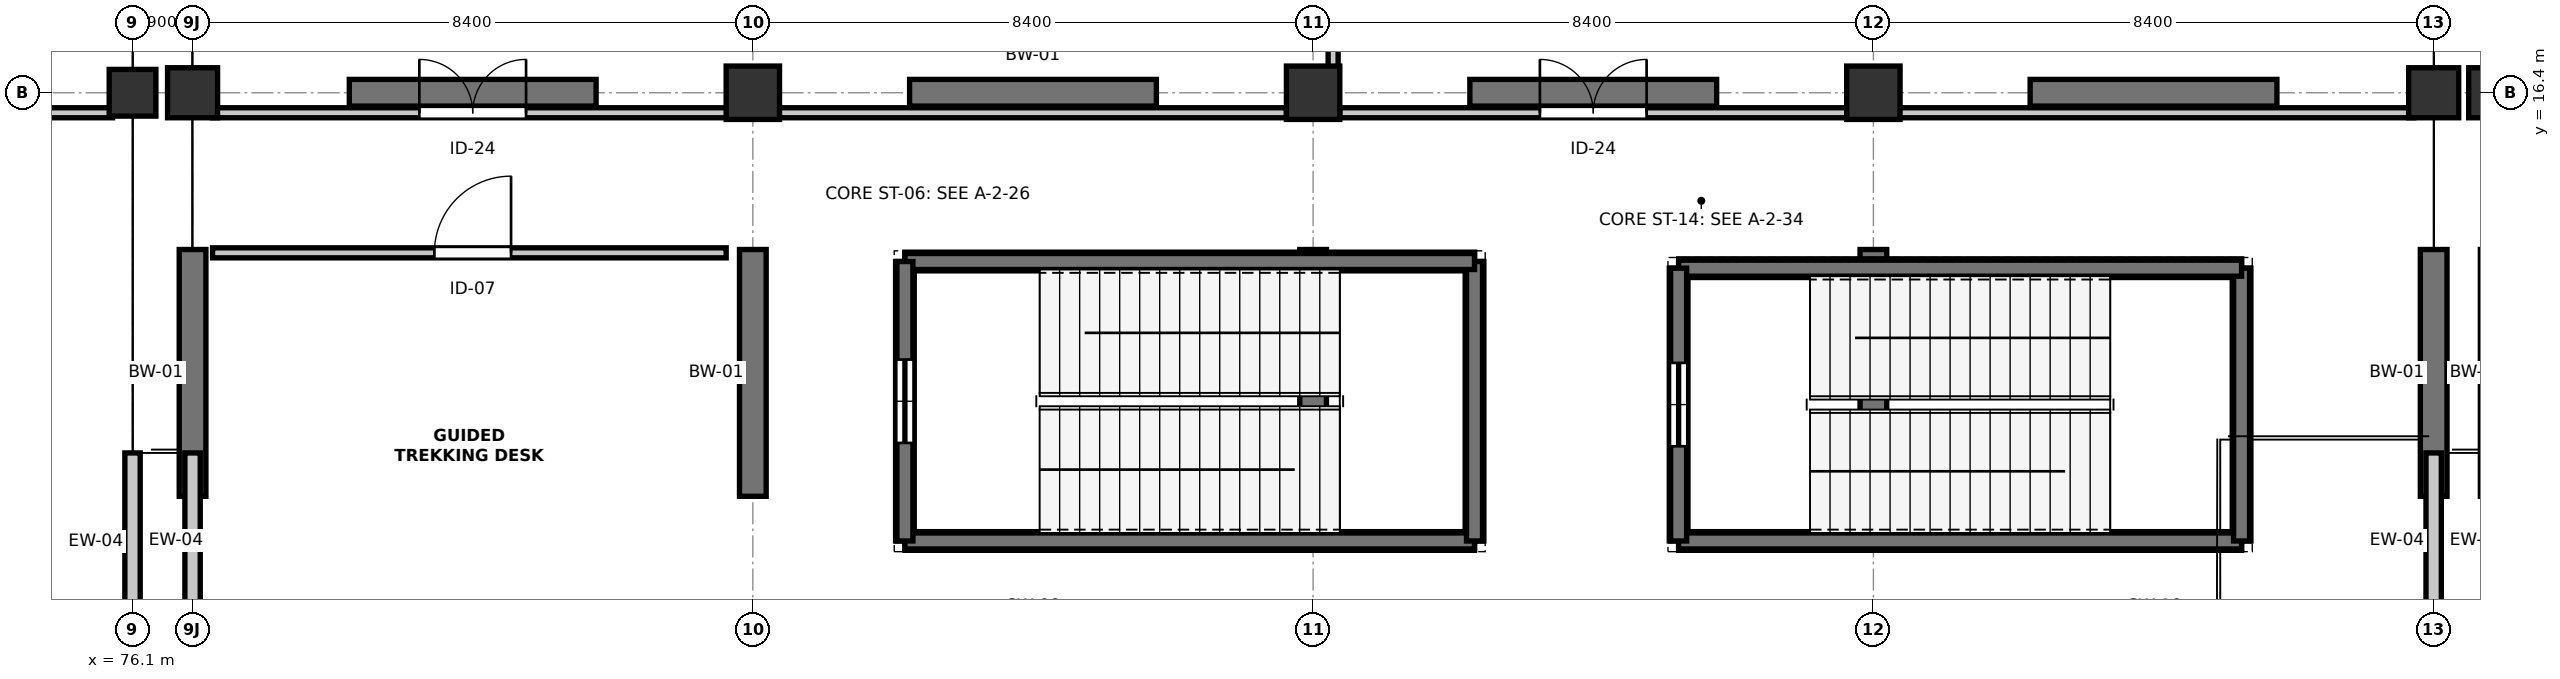
"""IFC4 building model, lengths in metres.
Left out: names, types, materials, properties, quantities, classifications, styles, units other than length and angle.
Written with IfcOpenShell. Run it as: python <this file> out.ifc"""

import sys

from ifc_helpers import new_model, si_unit, direction, frame, frame_2d, origin, origin_2d, place, context, subcontext, project, spatial, rectangle, extrude, element, fill, save


model = new_model("IFC4")
c1 = context("Model", 3, precision=1e-05, world=origin(), true_north=direction((0.0, 1.0)))
c2 = subcontext(c1, "Body", "Model", "MODEL_VIEW")
j1 = project(units=[si_unit("LENGTHUNIT", "METRE"), si_unit("PLANEANGLEUNIT", "RADIAN")], contexts=[c1])
p1 = place(None, origin())
s1 = spatial("IfcSite", under=j1, at=p1, CompositionType="ELEMENT")
p2 = place(p1, origin())
s2 = spatial("IfcBuilding", under=s1, at=p2, CompositionType="ELEMENT")
p3 = place(p2, frame((0.0, 0.0, 4.8)))
s3 = spatial("IfcBuildingStorey", under=s2, at=p3, CompositionType="ELEMENT", Elevation=4.8)
p4 = place(p3, frame((76.1, 16.4, 0.0), z_axis=(0.0, 0.0, 1.0), x_axis=(1.0, 0.0, 0.0)))
e1 = element("IfcColumn", 1, at=p4, inside=s3, PredefinedType="COLUMN", context=c2, shape_type="SweptSolid", body=[
    extrude(rectangle(XDim=0.7, YDim=0.7, at=origin_2d()), origin(), (0.0, 0.0, 1.0), 4.8),
])
p5 = place(p3, frame((77.0, 16.4, 0.0), z_axis=(0.0, 0.0, 1.0), x_axis=(1.0, 0.0, 0.0)))
e2 = element("IfcColumn", 2, at=p5, inside=s3, PredefinedType="COLUMN", context=c2, shape_type="SweptSolid", body=[
    extrude(rectangle(XDim=0.75, YDim=0.75, at=origin_2d()), origin(), (0.0, 0.0, 1.0), 4.8),
])
for number, where, z_axis, x_axis in (
    (3, (85.4, 16.4, 0.0), (0.0, 0.0, 1.0), (1.0, 0.0, 0.0)),
    (4, (93.8, 16.4, 0.0), (0.0, 0.0, 1.0), (1.0, 0.0, 0.0)),
    (5, (102.2, 16.4, 0.0), (0.0, 0.0, 1.0), (1.0, 0.0, 0.0)),
):
    element("IfcColumn", number, at=place(p3, frame(where, z_axis=z_axis, x_axis=x_axis)), inside=s3, PredefinedType="COLUMN", context=c2, shape_type="SweptSolid", body=[
        extrude(rectangle(XDim=0.8, YDim=0.8, at=origin_2d()), origin(), (0.0, 0.0, 1.0), 4.8),
    ])
p6 = place(p3, frame((110.6, 16.4, 0.0), z_axis=(0.0, 0.0, 1.0), x_axis=(1.0, 0.0, 0.0)))
e6 = element("IfcColumn", 6, at=p6, inside=s3, PredefinedType="COLUMN", context=c2, shape_type="SweptSolid", body=[
    extrude(rectangle(XDim=0.75, YDim=0.75, at=origin_2d()), origin(), (0.0, 0.0, 1.0), 4.8),
])
for number, where, z_axis, x_axis in (
    (7, (79.35, 16.4, -2.1), (0.0, 0.0, 1.0), (1.0, 0.0, 0.0)),
    (8, (87.75, 16.4, -2.1), (0.0, 0.0, 1.0), (1.0, 0.0, 0.0)),
):
    element("IfcWall", number, at=place(p3, frame(where, z_axis=z_axis, x_axis=x_axis)), inside=s3, PredefinedType="SOLIDWALL", context=c2, shape_type="SweptSolid", body=[
        extrude(rectangle(XDim=3.7, YDim=0.4, at=frame_2d((1.85, 0.0))), origin(), (0.0, 0.0, 1.0), 1.85),
    ])
p7 = place(p3, frame((96.15, 16.4, -2.1), z_axis=(0.0, 0.0, 1.0), x_axis=(1.0, 0.0, 0.0)))
e9 = element("IfcWall", 9, at=p7, inside=s3, PredefinedType="SOLIDWALL", context=c2, shape_type="SweptSolid", body=[
    extrude(rectangle(XDim=3.7, YDim=0.4, at=frame_2d((1.85, 0.0))), origin(), (0.0, 0.0, 1.0), 1.85),
])
for number, where, z_axis, x_axis in (
    (10, (104.55, 16.4, -2.1), (0.0, 0.0, 1.0), (1.0, 0.0, 0.0)),
    (11, (77.0, 10.35, -2.1), (0.0, 0.0, 1.0), (0.0, 1.0, 0.0)),
    (12, (85.4, 10.35, -2.1), (0.0, 0.0, 1.0), (0.0, 1.0, 0.0)),
):
    element("IfcWall", number, at=place(p3, frame(where, z_axis=z_axis, x_axis=x_axis)), inside=s3, PredefinedType="SOLIDWALL", context=c2, shape_type="SweptSolid", body=[
        extrude(rectangle(XDim=3.7, YDim=0.4, at=frame_2d((1.85, 0.0))), origin(), (0.0, 0.0, 1.0), 1.85),
    ])
for number, where, z_axis, x_axis in (
    (13, (93.8, 9.82, -2.1), (0.0, 0.0, 1.0), (0.0, 1.0, 0.0)),
    (14, (102.2, 9.82, -2.1), (0.0, 0.0, 1.0), (0.0, 1.0, 0.0)),
):
    element("IfcWall", number, at=place(p3, frame(where, z_axis=z_axis, x_axis=x_axis)), inside=s3, PredefinedType="SOLIDWALL", context=c2, shape_type="SweptSolid", body=[
        extrude(rectangle(XDim=4.23, YDim=0.4, at=frame_2d((2.115, 0.0))), origin(), (0.0, 0.0, 1.0), 1.85),
    ])
p8 = place(p3, frame((110.6, 10.35, -2.1), z_axis=(0.0, 0.0, 1.0), x_axis=(0.0, 1.0, 0.0)))
e15 = element("IfcWall", 15, at=p8, inside=s3, PredefinedType="SOLIDWALL", context=c2, shape_type="SweptSolid", body=[
    extrude(rectangle(XDim=3.7, YDim=0.4, at=frame_2d((1.85, 0.0))), origin(), (0.0, 0.0, 1.0), 1.85),
])
p9 = place(p3, frame((111.5, 16.4, 0.0), z_axis=(0.0, 0.0, 1.0), x_axis=(1.0, 0.0, 0.0)))
e16 = element("IfcColumn", 16, at=p9, inside=s3, PredefinedType="COLUMN", context=c2, shape_type="SweptSolid", body=[
    extrude(rectangle(XDim=0.75, YDim=0.75, at=origin_2d()), origin(), (0.0, 0.0, 1.0), 4.8),
])
p10 = place(p3, frame((87.68, 9.68, -2.1), z_axis=(0.0, 0.0, 1.0), x_axis=(1.0, 0.0, 0.0)))
e17 = element("IfcWall", 17, at=p10, inside=s3, PredefinedType="SOLIDWALL", context=c2, shape_type="SweptSolid", body=[
    extrude(rectangle(XDim=8.54, YDim=0.28, at=frame_2d((4.27, 0.0))), origin(), (0.0, 0.0, 1.0), 1.8),
])
p11 = place(p3, frame((96.22, 9.68, -2.1), z_axis=(0.0, 0.0, 1.0), x_axis=(0.0, 1.0, 0.0)))
e18 = element("IfcWall", 18, at=p11, inside=s3, PredefinedType="SOLIDWALL", context=c2, shape_type="SweptSolid", body=[
    extrude(rectangle(XDim=4.19, YDim=0.28, at=frame_2d((2.095, 0.0))), origin(), (0.0, 0.0, 1.0), 1.8),
])
p12 = place(p3, frame((96.22, 13.87, -2.1), z_axis=(0.0, 0.0, 1.0), x_axis=(-1.0, 0.0, 0.0)))
e19 = element("IfcWall", 19, at=p12, inside=s3, PredefinedType="SOLIDWALL", context=c2, shape_type="SweptSolid", body=[
    extrude(rectangle(XDim=8.54, YDim=0.28, at=frame_2d((4.27, 0.0))), origin(), (0.0, 0.0, 1.0), 1.8),
])
p13 = place(p3, frame((87.68, 13.87, -2.1), z_axis=(0.0, 0.0, 1.0), x_axis=(0.0, -1.0, 0.0)))
e20 = element("IfcWall", 20, at=p13, inside=s3, PredefinedType="SOLIDWALL", context=c2, shape_type="SweptSolid", body=[
    extrude(rectangle(XDim=4.19, YDim=0.28, at=frame_2d((2.095, 0.0))), origin(), (0.0, 0.0, 1.0), 1.8),
])
p14 = place(p3, frame((99.28, 9.68, -2.1), z_axis=(0.0, 0.0, 1.0), x_axis=(1.0, 0.0, 0.0)))
e21 = element("IfcWall", 21, at=p14, inside=s3, PredefinedType="SOLIDWALL", context=c2, shape_type="SweptSolid", body=[
    extrude(rectangle(XDim=8.44, YDim=0.28, at=frame_2d((4.22, 0.0))), origin(), (0.0, 0.0, 1.0), 1.8),
])
p15 = place(p3, frame((107.72, 9.68, -2.1), z_axis=(0.0, 0.0, 1.0), x_axis=(0.0, 1.0, 0.0)))
e22 = element("IfcWall", 22, at=p15, inside=s3, PredefinedType="SOLIDWALL", context=c2, shape_type="SweptSolid", body=[
    extrude(rectangle(XDim=4.09, YDim=0.28, at=frame_2d((2.045, 0.0))), origin(), (0.0, 0.0, 1.0), 1.8),
])
p16 = place(p3, frame((107.72, 13.77, -2.1), z_axis=(0.0, 0.0, 1.0), x_axis=(-1.0, 0.0, 0.0)))
e23 = element("IfcWall", 23, at=p16, inside=s3, PredefinedType="SOLIDWALL", context=c2, shape_type="SweptSolid", body=[
    extrude(rectangle(XDim=8.44, YDim=0.28, at=frame_2d((4.22, 0.0))), origin(), (0.0, 0.0, 1.0), 1.8),
])
p17 = place(p3, frame((99.28, 13.77, -2.1), z_axis=(0.0, 0.0, 1.0), x_axis=(0.0, -1.0, 0.0)))
e24 = element("IfcWall", 24, at=p17, inside=s3, PredefinedType="SOLIDWALL", context=c2, shape_type="SweptSolid", body=[
    extrude(rectangle(XDim=4.09, YDim=0.28, at=frame_2d((2.045, 0.0))), origin(), (0.0, 0.0, 1.0), 1.8),
])
p18 = place(p3, frame((76.1, 8.35, 0.0), z_axis=(0.0, 0.0, 1.0), x_axis=(0.0, 1.0, 0.0)))
e25 = element("IfcWall", 25, at=p18, inside=s3, PredefinedType="STANDARD", context=c2, shape_type="SweptSolid", body=[
    extrude(rectangle(XDim=2.65, YDim=0.23, at=frame_2d((1.325, 0.0))), origin(), (0.0, 0.0, 1.0), 3.785),
])
for number, where, z_axis, x_axis in (
    (26, (110.6, 8.375, 0.0), (0.0, 0.0, 1.0), (0.0, 1.0, 0.0)),
    (27, (77.0, 8.375, 0.0), (0.0, 0.0, 1.0), (0.0, 1.0, 0.0)),
):
    element("IfcWall", number, at=place(p3, frame(where, z_axis=z_axis, x_axis=x_axis)), inside=s3, PredefinedType="STANDARD", context=c2, shape_type="SweptSolid", body=[
        extrude(rectangle(XDim=2.625, YDim=0.23, at=frame_2d((1.312, 0.0))), origin(), (0.0, 0.0, 1.0), 3.785),
    ])
p19 = place(p3, frame((87.68, 9.68, 0.0), z_axis=(0.0, 0.0, 1.0), x_axis=(1.0, 0.0, 0.0)))
e28 = element("IfcWall", 28, at=p19, inside=s3, PredefinedType="SHEAR", context=c2, shape_type="SweptSolid", body=[
    extrude(rectangle(XDim=8.54, YDim=0.24, at=frame_2d((4.27, 0.0))), origin(), (0.0, 0.0, 1.0), 4.55),
])
p20 = place(p3, frame((96.22, 9.68, 0.0), z_axis=(0.0, 0.0, 1.0), x_axis=(0.0, 1.0, 0.0)))
e29 = element("IfcWall", 29, at=p20, inside=s3, PredefinedType="SHEAR", context=c2, shape_type="SweptSolid", body=[
    extrude(rectangle(XDim=4.19, YDim=0.24, at=frame_2d((2.095, 0.0))), origin(), (0.0, 0.0, 1.0), 4.55),
])
p21 = place(p3, frame((96.22, 13.87, 0.0), z_axis=(0.0, 0.0, 1.0), x_axis=(-1.0, 0.0, 0.0)))
e30 = element("IfcWall", 30, at=p21, inside=s3, PredefinedType="SHEAR", context=c2, shape_type="SweptSolid", body=[
    extrude(rectangle(XDim=8.54, YDim=0.24, at=frame_2d((4.27, 0.0))), origin(), (0.0, 0.0, 1.0), 4.55),
])
p22 = place(p3, frame((87.68, 13.87, 0.0), z_axis=(0.0, 0.0, 1.0), x_axis=(0.0, -1.0, 0.0)))
e31 = element("IfcWall", 31, at=p22, inside=s3, PredefinedType="SHEAR", context=c2, shape_type="SweptSolid", body=[
    extrude(rectangle(XDim=4.19, YDim=0.24, at=frame_2d((2.095, 0.0))), origin(), (0.0, 0.0, 1.0), 4.55),
])
p23 = place(p22, frame((1.47, 0.0, 0.0)))
e32 = element("IfcOpeningElement", 32, at=p23, cuts=e31, PredefinedType="OPENING", context=c2, shape_type="SweptSolid", body=[
    extrude(rectangle(XDim=1.25, YDim=2.2, at=frame_2d((0.625, 1.1))), frame((0.0, 0.13, 0.0), z_axis=(0.0, -1.0, 0.0), x_axis=(1.0, 0.0, 0.0)), (0.0, 0.0, 1.0), 0.26),
])
p24 = place(p3, frame((99.28, 9.68, 0.0), z_axis=(0.0, 0.0, 1.0), x_axis=(1.0, 0.0, 0.0)))
e33 = element("IfcWall", 33, at=p24, inside=s3, PredefinedType="SHEAR", context=c2, shape_type="SweptSolid", body=[
    extrude(rectangle(XDim=8.44, YDim=0.24, at=frame_2d((4.22, 0.0))), origin(), (0.0, 0.0, 1.0), 4.55),
])
p25 = place(p3, frame((107.72, 9.68, 0.0), z_axis=(0.0, 0.0, 1.0), x_axis=(0.0, 1.0, 0.0)))
e34 = element("IfcWall", 34, at=p25, inside=s3, PredefinedType="SHEAR", context=c2, shape_type="SweptSolid", body=[
    extrude(rectangle(XDim=4.09, YDim=0.24, at=frame_2d((2.045, 0.0))), origin(), (0.0, 0.0, 1.0), 4.55),
])
p26 = place(p3, frame((107.72, 13.77, 0.0), z_axis=(0.0, 0.0, 1.0), x_axis=(-1.0, 0.0, 0.0)))
e35 = element("IfcWall", 35, at=p26, inside=s3, PredefinedType="SHEAR", context=c2, shape_type="SweptSolid", body=[
    extrude(rectangle(XDim=8.44, YDim=0.24, at=frame_2d((4.22, 0.0))), origin(), (0.0, 0.0, 1.0), 4.55),
])
p27 = place(p3, frame((99.28, 13.77, 0.0), z_axis=(0.0, 0.0, 1.0), x_axis=(0.0, -1.0, 0.0)))
e36 = element("IfcWall", 36, at=p27, inside=s3, PredefinedType="SHEAR", context=c2, shape_type="SweptSolid", body=[
    extrude(rectangle(XDim=4.09, YDim=0.24, at=frame_2d((2.045, 0.0))), origin(), (0.0, 0.0, 1.0), 4.55),
])
p28 = place(p27, frame((1.42, 0.0, 0.0)))
e37 = element("IfcOpeningElement", 37, at=p28, cuts=e36, PredefinedType="OPENING", context=c2, shape_type="SweptSolid", body=[
    extrude(rectangle(XDim=1.25, YDim=2.2, at=frame_2d((0.625, 1.1))), frame((0.0, 0.13, 0.0), z_axis=(0.0, -1.0, 0.0), x_axis=(1.0, 0.0, 0.0)), (0.0, 0.0, 1.0), 0.26),
])
p29 = place(p3, frame((60.6, 16.1, 0.0), z_axis=(0.0, 0.0, 1.0), x_axis=(1.0, 0.0, 0.0)))
e38 = element("IfcWall", 38, at=p29, inside=s3, PredefinedType="PARTITIONING", context=c2, shape_type="SweptSolid", body=[
    extrude(rectangle(XDim=15.2, YDim=0.15, at=frame_2d((7.6, 0.0))), origin(), (0.0, 0.0, 1.0), 3.685),
])
p30 = place(p29, frame((2.4, 0.0, 0.0)))
e39 = element("IfcOpeningElement", 39, at=p30, cuts=e38, PredefinedType="OPENING", context=c2, shape_type="SweptSolid", body=[
    extrude(rectangle(XDim=1.6, YDim=2.28, at=frame_2d((0.8, 1.14))), frame((0.0, 0.085, 0.0), z_axis=(0.0, -1.0, 0.0), x_axis=(1.0, 0.0, 0.0)), (0.0, 0.0, 1.0), 0.17),
])
p31 = place(p3, frame((77.3, 16.1, 0.0), z_axis=(0.0, 0.0, 1.0), x_axis=(1.0, 0.0, 0.0)))
e40 = element("IfcWall", 40, at=p31, inside=s3, PredefinedType="PARTITIONING", context=c2, shape_type="SweptSolid", body=[
    extrude(rectangle(XDim=16.1, YDim=0.15, at=frame_2d((8.05, 0.0))), origin(), (0.0, 0.0, 1.0), 3.685),
])
p32 = place(p31, frame((3.1, 0.0, 0.0)))
e41 = element("IfcOpeningElement", 41, at=p32, cuts=e40, PredefinedType="OPENING", context=c2, shape_type="SweptSolid", body=[
    extrude(rectangle(XDim=1.6, YDim=2.28, at=frame_2d((0.8, 1.14))), frame((0.0, 0.085, 0.0), z_axis=(0.0, -1.0, 0.0), x_axis=(1.0, 0.0, 0.0)), (0.0, 0.0, 1.0), 0.17),
])
p33 = place(p3, frame((94.2, 16.1, 0.0), z_axis=(0.0, 0.0, 1.0), x_axis=(1.0, 0.0, 0.0)))
e42 = element("IfcWall", 42, at=p33, inside=s3, PredefinedType="PARTITIONING", context=c2, shape_type="SweptSolid", body=[
    extrude(rectangle(XDim=16.1, YDim=0.15, at=frame_2d((8.05, 0.0))), origin(), (0.0, 0.0, 1.0), 3.685),
])
p34 = place(p33, frame((3.0, 0.0, 0.0)))
e43 = element("IfcOpeningElement", 43, at=p34, cuts=e42, PredefinedType="OPENING", context=c2, shape_type="SweptSolid", body=[
    extrude(rectangle(XDim=1.6, YDim=2.28, at=frame_2d((0.8, 1.14))), frame((0.0, 0.085, 0.0), z_axis=(0.0, -1.0, 0.0), x_axis=(1.0, 0.0, 0.0)), (0.0, 0.0, 1.0), 0.17),
])
p35 = place(p3, frame((94.1, 16.25, 0.0), z_axis=(0.0, 0.0, 1.0), x_axis=(0.0, 1.0, 0.0)))
e44 = element("IfcWall", 44, at=p35, inside=s3, PredefinedType="PARTITIONING", context=c2, shape_type="SweptSolid", body=[
    extrude(rectangle(XDim=8.25, YDim=0.15, at=frame_2d((4.125, 0.0))), origin(), (0.0, 0.0, 1.0), 4.135),
])
p36 = place(p3, frame((77.3, 14.0, 0.0), z_axis=(0.0, 0.0, 1.0), x_axis=(1.0, 0.0, 0.0)))
e45 = element("IfcWall", 45, at=p36, inside=s3, PredefinedType="PARTITIONING", context=c2, shape_type="SweptSolid", body=[
    extrude(rectangle(XDim=7.7, YDim=0.15, at=frame_2d((3.85, 0.0))), origin(), (0.0, 0.0, 1.0), 4.535),
])
p37 = place(p36, frame((3.325, 0.0, 0.0)))
e46 = element("IfcOpeningElement", 46, at=p37, cuts=e45, PredefinedType="OPENING", context=c2, shape_type="SweptSolid", body=[
    extrude(rectangle(XDim=1.15, YDim=2.15, at=frame_2d((0.575, 1.075))), frame((0.0, 0.085, 0.0), z_axis=(0.0, -1.0, 0.0), x_axis=(1.0, 0.0, 0.0)), (0.0, 0.0, 1.0), 0.17),
])
p38 = place(p23, origin())
e47 = element("IfcDoor", 47, at=p38, inside=s3, OperationType="SINGLE_SWING_RIGHT", PredefinedType="DOOR", context=c2, shape_type="SweptSolid", body=[
    extrude(rectangle(XDim=1.25, YDim=2.2, at=frame_2d((0.625, 1.1))), frame((0.0, 0.025, 0.0), z_axis=(0.0, -1.0, 0.0), x_axis=(1.0, 0.0, 0.0)), (0.0, 0.0, 1.0), 0.05),
])
fill(e32, e47)
p39 = place(p28, origin())
e48 = element("IfcDoor", 48, at=p39, inside=s3, OperationType="SINGLE_SWING_LEFT", PredefinedType="DOOR", context=c2, shape_type="SweptSolid", body=[
    extrude(rectangle(XDim=1.25, YDim=2.2, at=frame_2d((0.625, 1.1))), frame((0.0, 0.025, 0.0), z_axis=(0.0, -1.0, 0.0), x_axis=(1.0, 0.0, 0.0)), (0.0, 0.0, 1.0), 0.05),
])
fill(e37, e48)
p40 = place(p32, origin())
e49 = element("IfcDoor", 49, at=p40, inside=s3, OperationType="DOUBLE_DOOR_SINGLE_SWING", PredefinedType="DOOR", context=c2, shape_type="SweptSolid", body=[
    extrude(rectangle(XDim=1.6, YDim=2.28, at=frame_2d((0.8, 1.14))), frame((0.0, 0.025, 0.0), z_axis=(0.0, -1.0, 0.0), x_axis=(1.0, 0.0, 0.0)), (0.0, 0.0, 1.0), 0.05),
])
fill(e41, e49)
p41 = place(p34, origin())
e50 = element("IfcDoor", 50, at=p41, inside=s3, OperationType="DOUBLE_DOOR_SINGLE_SWING", PredefinedType="DOOR", context=c2, shape_type="SweptSolid", body=[
    extrude(rectangle(XDim=1.6, YDim=2.28, at=frame_2d((0.8, 1.14))), frame((0.0, 0.025, 0.0), z_axis=(0.0, -1.0, 0.0), x_axis=(1.0, 0.0, 0.0)), (0.0, 0.0, 1.0), 0.05),
])
fill(e43, e50)
p42 = place(p37, origin())
e51 = element("IfcDoor", 51, at=p42, inside=s3, OperationType="SINGLE_SWING_RIGHT", PredefinedType="DOOR", context=c2, shape_type="SweptSolid", body=[
    extrude(rectangle(XDim=1.15, YDim=2.15, at=frame_2d((0.575, 1.075))), frame((0.0, 0.025, 0.0), z_axis=(0.0, -1.0, 0.0), x_axis=(1.0, 0.0, 0.0)), (0.0, 0.0, 1.0), 0.05),
])
fill(e46, e51)
save(model, sys.argv[1])
